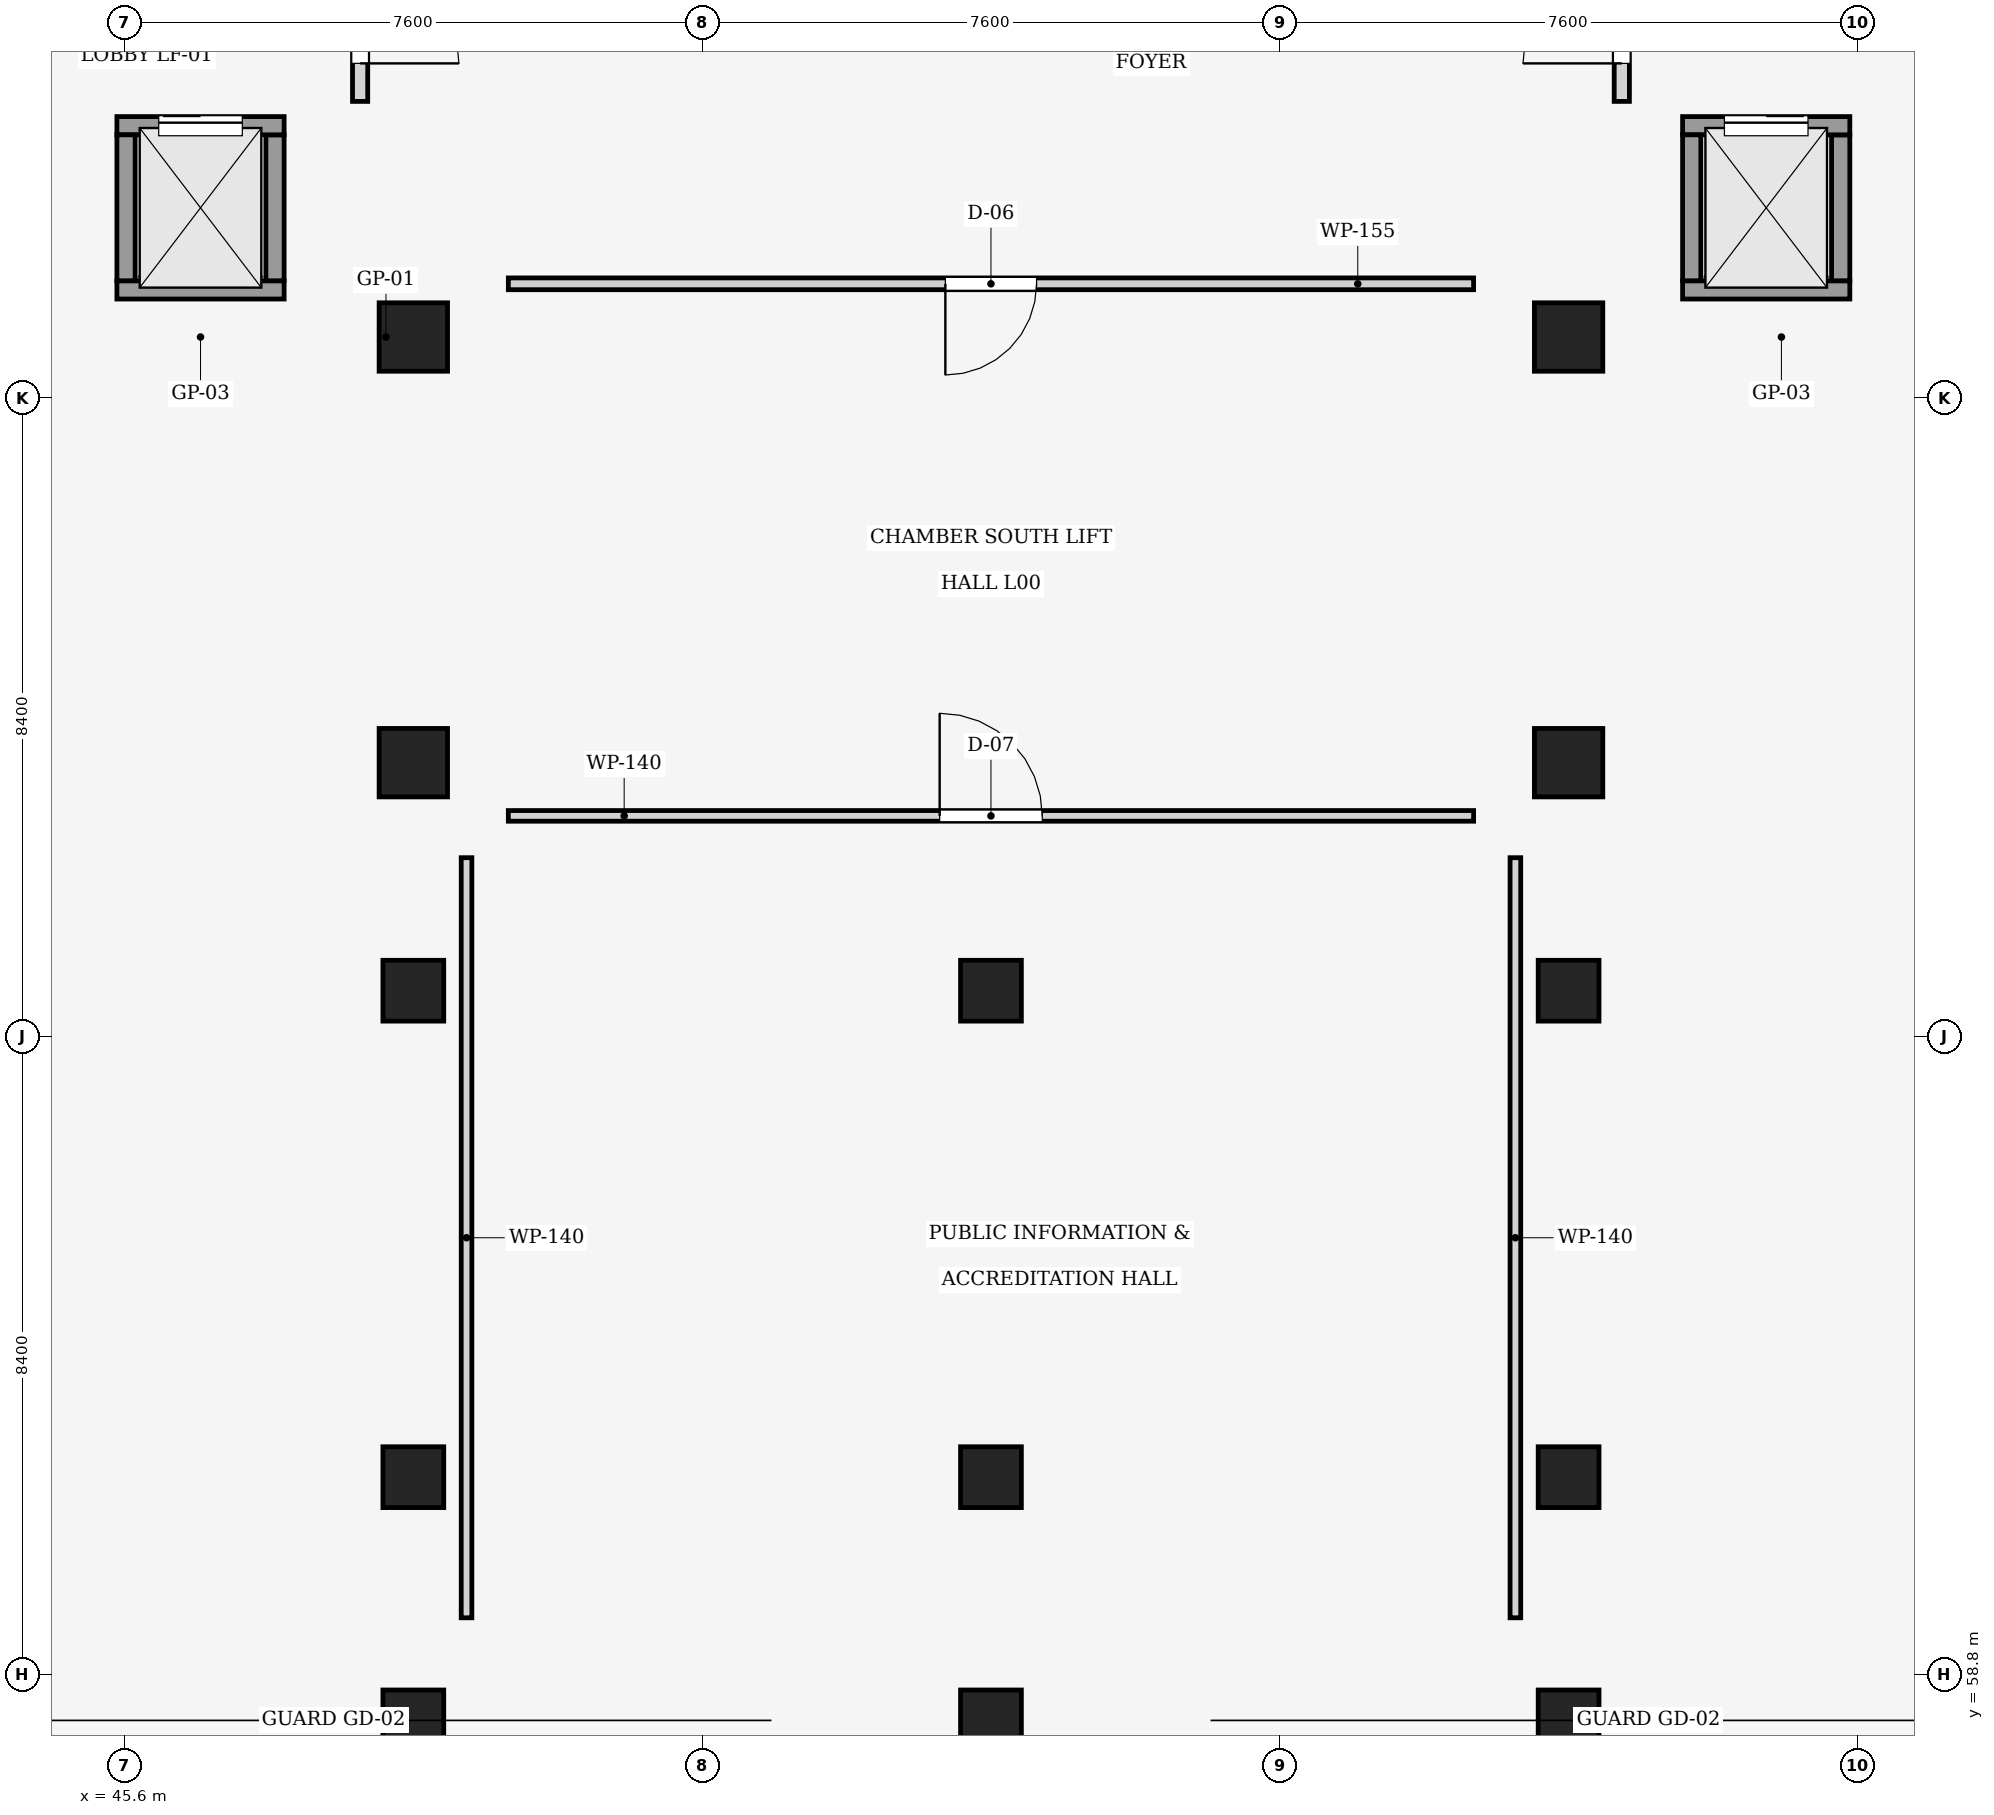
"""IFC4 building model, lengths in metres.
Left out: names, types, materials, properties, quantities, classifications, styles, units other than length and angle.
Written with IfcOpenShell. Run it as: python <this file> out.ifc"""

import sys

from ifc_helpers import new_model, si_unit, direction, frame, frame_2d, origin, origin_2d, place, context, subcontext, project, spatial, rectangle, extrude, element, fill, save


model = new_model("IFC4")
c1 = context("Model", 3, precision=1e-05, world=origin(), true_north=direction((0.0, 1.0)))
c2 = subcontext(c1, "Body", "Model", "MODEL_VIEW")
j1 = project(units=[si_unit("LENGTHUNIT", "METRE"), si_unit("PLANEANGLEUNIT", "RADIAN")], contexts=[c1])
p1 = place(None, origin())
s1 = spatial("IfcSite", under=j1, at=p1, CompositionType="ELEMENT")
p2 = place(p1, origin())
s2 = spatial("IfcBuilding", under=s1, at=p2, CompositionType="ELEMENT")
p3 = place(p2, origin())
s3 = spatial("IfcBuildingStorey", under=s2, at=p3, CompositionType="ELEMENT", Elevation=0.0)
for number, where, z_axis, x_axis in (
    (1, (49.4, 70.8, 0.0), (0.0, 0.0, 1.0), (1.0, 0.0, 0.0)),
    (2, (49.4, 76.4, 0.0), (0.0, 0.0, 1.0), (1.0, 0.0, 0.0)),
    (3, (64.6, 70.8, 0.0), (0.0, 0.0, 1.0), (1.0, 0.0, 0.0)),
    (4, (64.6, 76.4, 0.0), (0.0, 0.0, 1.0), (1.0, 0.0, 0.0)),
):
    element("IfcColumn", number, at=place(p3, frame(where, z_axis=z_axis, x_axis=x_axis)), inside=s3, PredefinedType="COLUMN", context=c2, shape_type="SweptSolid", body=[
        extrude(rectangle(XDim=0.9, YDim=0.9, at=origin_2d()), origin(), (0.0, 0.0, 1.0), 5.1),
    ])
for number, where, z_axis, x_axis in (
    (5, (49.4, 67.8, 0.0), (0.0, 0.0, 1.0), (1.0, 0.0, 0.0)),
    (6, (57.0, 67.8, 0.0), (0.0, 0.0, 1.0), (1.0, 0.0, 0.0)),
    (7, (64.6, 67.8, 0.0), (0.0, 0.0, 1.0), (1.0, 0.0, 0.0)),
    (8, (49.4, 61.4, 0.0), (0.0, 0.0, 1.0), (1.0, 0.0, 0.0)),
    (9, (57.0, 61.4, 0.0), (0.0, 0.0, 1.0), (1.0, 0.0, 0.0)),
    (10, (64.6, 61.4, 0.0), (0.0, 0.0, 1.0), (1.0, 0.0, 0.0)),
    (11, (49.4, 58.2, 0.0), (0.0, 0.0, 1.0), (1.0, 0.0, 0.0)),
    (12, (57.0, 58.2, 0.0), (0.0, 0.0, 1.0), (1.0, 0.0, 0.0)),
    (13, (64.6, 58.2, 0.0), (0.0, 0.0, 1.0), (1.0, 0.0, 0.0)),
):
    element("IfcColumn", number, at=place(p3, frame(where, z_axis=z_axis, x_axis=x_axis)), inside=s3, PredefinedType="COLUMN", context=c2, shape_type="SweptSolid", body=[
        extrude(rectangle(XDim=0.8, YDim=0.8, at=origin_2d()), origin(), (0.0, 0.0, 1.0), 5.1),
    ])
p4 = place(p3, frame((47.7, 77.02, 0.0), z_axis=(0.0, 0.0, 1.0), x_axis=(-1.0, 0.0, 0.0)))
e14 = element("IfcWall", 14, at=p4, inside=s3, PredefinedType="SHEAR", context=c2, shape_type="SweptSolid", body=[
    extrude(rectangle(XDim=2.2, YDim=0.24, at=frame_2d((1.1, 0.0))), origin(), (0.0, 0.0, 1.0), 5.1),
])
p5 = place(p3, frame((47.58, 79.06, 0.0), z_axis=(0.0, 0.0, 1.0), x_axis=(0.0, -1.0, 0.0)))
e15 = element("IfcWall", 15, at=p5, inside=s3, PredefinedType="SHEAR", context=c2, shape_type="SweptSolid", body=[
    extrude(rectangle(XDim=1.92, YDim=0.24, at=frame_2d((0.96, 0.0))), origin(), (0.0, 0.0, 1.0), 5.1),
])
p6 = place(p3, frame((45.5, 79.18, 0.0), z_axis=(0.0, 0.0, 1.0), x_axis=(1.0, 0.0, 0.0)))
e16 = element("IfcWall", 16, at=p6, inside=s3, PredefinedType="SHEAR", context=c2, shape_type="SweptSolid", body=[
    extrude(rectangle(XDim=2.2, YDim=0.24, at=frame_2d((1.1, 0.0))), origin(), (0.0, 0.0, 1.0), 5.1),
])
p7 = place(p6, frame((0.55, 0.0, 0.0)))
e17 = element("IfcOpeningElement", 17, at=p7, cuts=e16, PredefinedType="OPENING", context=c2, shape_type="SweptSolid", body=[
    extrude(rectangle(XDim=1.1, YDim=2.15, at=frame_2d((0.55, 1.075))), frame((0.0, 0.13, 0.0), z_axis=(0.0, -1.0, 0.0), x_axis=(1.0, 0.0, 0.0)), (0.0, 0.0, 1.0), 0.26),
])
p8 = place(p3, frame((45.62, 77.14, 0.0), z_axis=(0.0, 0.0, 1.0), x_axis=(0.0, 1.0, 0.0)))
e18 = element("IfcWall", 18, at=p8, inside=s3, PredefinedType="SHEAR", context=c2, shape_type="SweptSolid", body=[
    extrude(rectangle(XDim=1.92, YDim=0.24, at=frame_2d((0.96, 0.0))), origin(), (0.0, 0.0, 1.0), 5.1),
])
p9 = place(p3, frame((48.7, 81.8, 0.0), z_axis=(0.0, 0.0, 1.0), x_axis=(0.0, -1.0, 0.0)))
e19 = element("IfcWall", 19, at=p9, inside=s3, PredefinedType="PARTITIONING", context=c2, shape_type="SweptSolid", body=[
    extrude(rectangle(XDim=2.3, YDim=0.2, at=frame_2d((1.15, 0.0))), origin(), (0.0, 0.0, 1.0), 2.9),
])
p10 = place(p9, frame((0.5, 0.0, 0.0)))
e20 = element("IfcOpeningElement", 20, at=p10, cuts=e19, PredefinedType="OPENING", context=c2, shape_type="SweptSolid", body=[
    extrude(rectangle(XDim=1.3, YDim=2.2, at=frame_2d((0.65, 1.1))), frame((0.0, 0.11, 0.0), z_axis=(0.0, -1.0, 0.0), x_axis=(1.0, 0.0, 0.0)), (0.0, 0.0, 1.0), 0.22),
])
p11 = place(p3, frame((68.3, 77.02, 0.0), z_axis=(0.0, 0.0, 1.0), x_axis=(-1.0, 0.0, 0.0)))
e21 = element("IfcWall", 21, at=p11, inside=s3, PredefinedType="SHEAR", context=c2, shape_type="SweptSolid", body=[
    extrude(rectangle(XDim=2.2, YDim=0.24, at=frame_2d((1.1, 0.0))), origin(), (0.0, 0.0, 1.0), 5.1),
])
p12 = place(p3, frame((68.18, 79.06, 0.0), z_axis=(0.0, 0.0, 1.0), x_axis=(0.0, -1.0, 0.0)))
e22 = element("IfcWall", 22, at=p12, inside=s3, PredefinedType="SHEAR", context=c2, shape_type="SweptSolid", body=[
    extrude(rectangle(XDim=1.92, YDim=0.24, at=frame_2d((0.96, 0.0))), origin(), (0.0, 0.0, 1.0), 5.1),
])
p13 = place(p3, frame((66.1, 79.18, 0.0), z_axis=(0.0, 0.0, 1.0), x_axis=(1.0, 0.0, 0.0)))
e23 = element("IfcWall", 23, at=p13, inside=s3, PredefinedType="SHEAR", context=c2, shape_type="SweptSolid", body=[
    extrude(rectangle(XDim=2.2, YDim=0.24, at=frame_2d((1.1, 0.0))), origin(), (0.0, 0.0, 1.0), 5.1),
])
p14 = place(p13, frame((0.55, 0.0, 0.0)))
e24 = element("IfcOpeningElement", 24, at=p14, cuts=e23, PredefinedType="OPENING", context=c2, shape_type="SweptSolid", body=[
    extrude(rectangle(XDim=1.1, YDim=2.15, at=frame_2d((0.55, 1.075))), frame((0.0, 0.13, 0.0), z_axis=(0.0, -1.0, 0.0), x_axis=(1.0, 0.0, 0.0)), (0.0, 0.0, 1.0), 0.26),
])
p15 = place(p3, frame((66.22, 77.14, 0.0), z_axis=(0.0, 0.0, 1.0), x_axis=(0.0, 1.0, 0.0)))
e25 = element("IfcWall", 25, at=p15, inside=s3, PredefinedType="SHEAR", context=c2, shape_type="SweptSolid", body=[
    extrude(rectangle(XDim=1.92, YDim=0.24, at=frame_2d((0.96, 0.0))), origin(), (0.0, 0.0, 1.0), 5.1),
])
p16 = place(p3, frame((65.3, 79.5, 0.0), z_axis=(0.0, 0.0, 1.0), x_axis=(0.0, 1.0, 0.0)))
e26 = element("IfcWall", 26, at=p16, inside=s3, PredefinedType="PARTITIONING", context=c2, shape_type="SweptSolid", body=[
    extrude(rectangle(XDim=2.3, YDim=0.2, at=frame_2d((1.15, 0.0))), origin(), (0.0, 0.0, 1.0), 2.9),
])
p17 = place(p16, frame((0.5, 0.0, 0.0)))
e27 = element("IfcOpeningElement", 27, at=p17, cuts=e26, PredefinedType="OPENING", context=c2, shape_type="SweptSolid", body=[
    extrude(rectangle(XDim=1.3, YDim=2.2, at=frame_2d((0.65, 1.1))), frame((0.0, 0.11, 0.0), z_axis=(0.0, -1.0, 0.0), x_axis=(1.0, 0.0, 0.0)), (0.0, 0.0, 1.0), 0.22),
])
p18 = place(p3, frame((63.35, 77.1, 0.0), z_axis=(0.0, 0.0, 1.0), x_axis=(-1.0, 0.0, 0.0)))
e28 = element("IfcWall", 28, at=p18, inside=s3, PredefinedType="PARTITIONING", context=c2, shape_type="SweptSolid", body=[
    extrude(rectangle(XDim=12.7, YDim=0.155, at=frame_2d((6.35, 0.0))), origin(), (0.0, 0.0, 1.0), 4.395),
])
p19 = place(p18, frame((5.75, 0.0, 0.0)))
e29 = element("IfcOpeningElement", 29, at=p19, cuts=e28, PredefinedType="OPENING", context=c2, shape_type="SweptSolid", body=[
    extrude(rectangle(XDim=1.2, YDim=2.1, at=frame_2d((0.6, 1.05))), frame((0.0, 0.087, 0.0), z_axis=(0.0, -1.0, 0.0), x_axis=(1.0, 0.0, 0.0)), (0.0, 0.0, 1.0), 0.175),
])
p20 = place(p3, frame((50.65, 70.1, 0.0), z_axis=(0.0, 0.0, 1.0), x_axis=(1.0, 0.0, 0.0)))
e30 = element("IfcWall", 30, at=p20, inside=s3, PredefinedType="PARTITIONING", context=c2, shape_type="SweptSolid", body=[
    extrude(rectangle(XDim=12.7, YDim=0.14, at=frame_2d((6.35, 0.0))), origin(), (0.0, 0.0, 1.0), 4.73),
])
p21 = place(p20, frame((5.675, 0.0, 0.0)))
e31 = element("IfcOpeningElement", 31, at=p21, cuts=e30, PredefinedType="OPENING", context=c2, shape_type="SweptSolid", body=[
    extrude(rectangle(XDim=1.35, YDim=2.1, at=frame_2d((0.675, 1.05))), frame((0.0, 0.08, 0.0), z_axis=(0.0, -1.0, 0.0), x_axis=(1.0, 0.0, 0.0)), (0.0, 0.0, 1.0), 0.16),
])
for number, where, z_axis, x_axis in (
    (32, (63.9, 69.55, 0.0), (0.0, 0.0, 1.0), (0.0, -1.0, 0.0)),
    (33, (50.1, 59.55, 0.0), (0.0, 0.0, 1.0), (0.0, 1.0, 0.0)),
):
    element("IfcWall", number, at=place(p3, frame(where, z_axis=z_axis, x_axis=x_axis)), inside=s3, PredefinedType="PARTITIONING", context=c2, shape_type="SweptSolid", body=[
        extrude(rectangle(XDim=10.0, YDim=0.14, at=frame_2d((5.0, 0.0))), origin(), (0.0, 0.0, 1.0), 4.195),
    ])
p22 = place(p7, origin())
e34 = element("IfcDoor", 34, at=p22, inside=s3, OperationType="SLIDING_TO_LEFT", PredefinedType="DOOR", context=c2, shape_type="SweptSolid", body=[
    extrude(rectangle(XDim=1.1, YDim=2.15, at=frame_2d((0.55, 1.075))), frame((0.0, 0.025, 0.0), z_axis=(0.0, -1.0, 0.0), x_axis=(1.0, 0.0, 0.0)), (0.0, 0.0, 1.0), 0.05),
])
fill(e17, e34)
p23 = place(p10, origin())
e35 = element("IfcDoor", 35, at=p23, inside=s3, OperationType="SINGLE_SWING_RIGHT", PredefinedType="DOOR", context=c2, shape_type="SweptSolid", body=[
    extrude(rectangle(XDim=1.3, YDim=2.2, at=frame_2d((0.65, 1.1))), frame((0.0, 0.025, 0.0), z_axis=(0.0, -1.0, 0.0), x_axis=(1.0, 0.0, 0.0)), (0.0, 0.0, 1.0), 0.05),
])
fill(e20, e35)
p24 = place(p14, origin())
e36 = element("IfcDoor", 36, at=p24, inside=s3, OperationType="SLIDING_TO_RIGHT", PredefinedType="DOOR", context=c2, shape_type="SweptSolid", body=[
    extrude(rectangle(XDim=1.1, YDim=2.15, at=frame_2d((0.55, 1.075))), frame((0.0, 0.025, 0.0), z_axis=(0.0, -1.0, 0.0), x_axis=(1.0, 0.0, 0.0)), (0.0, 0.0, 1.0), 0.05),
])
fill(e24, e36)
p25 = place(p17, origin())
e37 = element("IfcDoor", 37, at=p25, inside=s3, OperationType="SINGLE_SWING_LEFT", PredefinedType="DOOR", context=c2, shape_type="SweptSolid", body=[
    extrude(rectangle(XDim=1.3, YDim=2.2, at=frame_2d((0.65, 1.1))), frame((0.0, 0.025, 0.0), z_axis=(0.0, -1.0, 0.0), x_axis=(1.0, 0.0, 0.0)), (0.0, 0.0, 1.0), 0.05),
])
fill(e27, e37)
p26 = place(p19, origin())
e38 = element("IfcDoor", 38, at=p26, inside=s3, OperationType="SINGLE_SWING_RIGHT", PredefinedType="DOOR", context=c2, shape_type="SweptSolid", body=[
    extrude(rectangle(XDim=1.2, YDim=2.1, at=frame_2d((0.6, 1.05))), frame((0.0, 0.025, 0.0), z_axis=(0.0, -1.0, 0.0), x_axis=(1.0, 0.0, 0.0)), (0.0, 0.0, 1.0), 0.05),
])
fill(e29, e38)
p27 = place(p21, origin())
e39 = element("IfcDoor", 39, at=p27, inside=s3, OperationType="SINGLE_SWING_LEFT", PredefinedType="DOOR", context=c2, shape_type="SweptSolid", body=[
    extrude(rectangle(XDim=1.35, YDim=2.1, at=frame_2d((0.675, 1.05))), frame((0.0, 0.025, 0.0), z_axis=(0.0, -1.0, 0.0), x_axis=(1.0, 0.0, 0.0)), (0.0, 0.0, 1.0), 0.05),
])
fill(e31, e39)
save(model, sys.argv[1])
